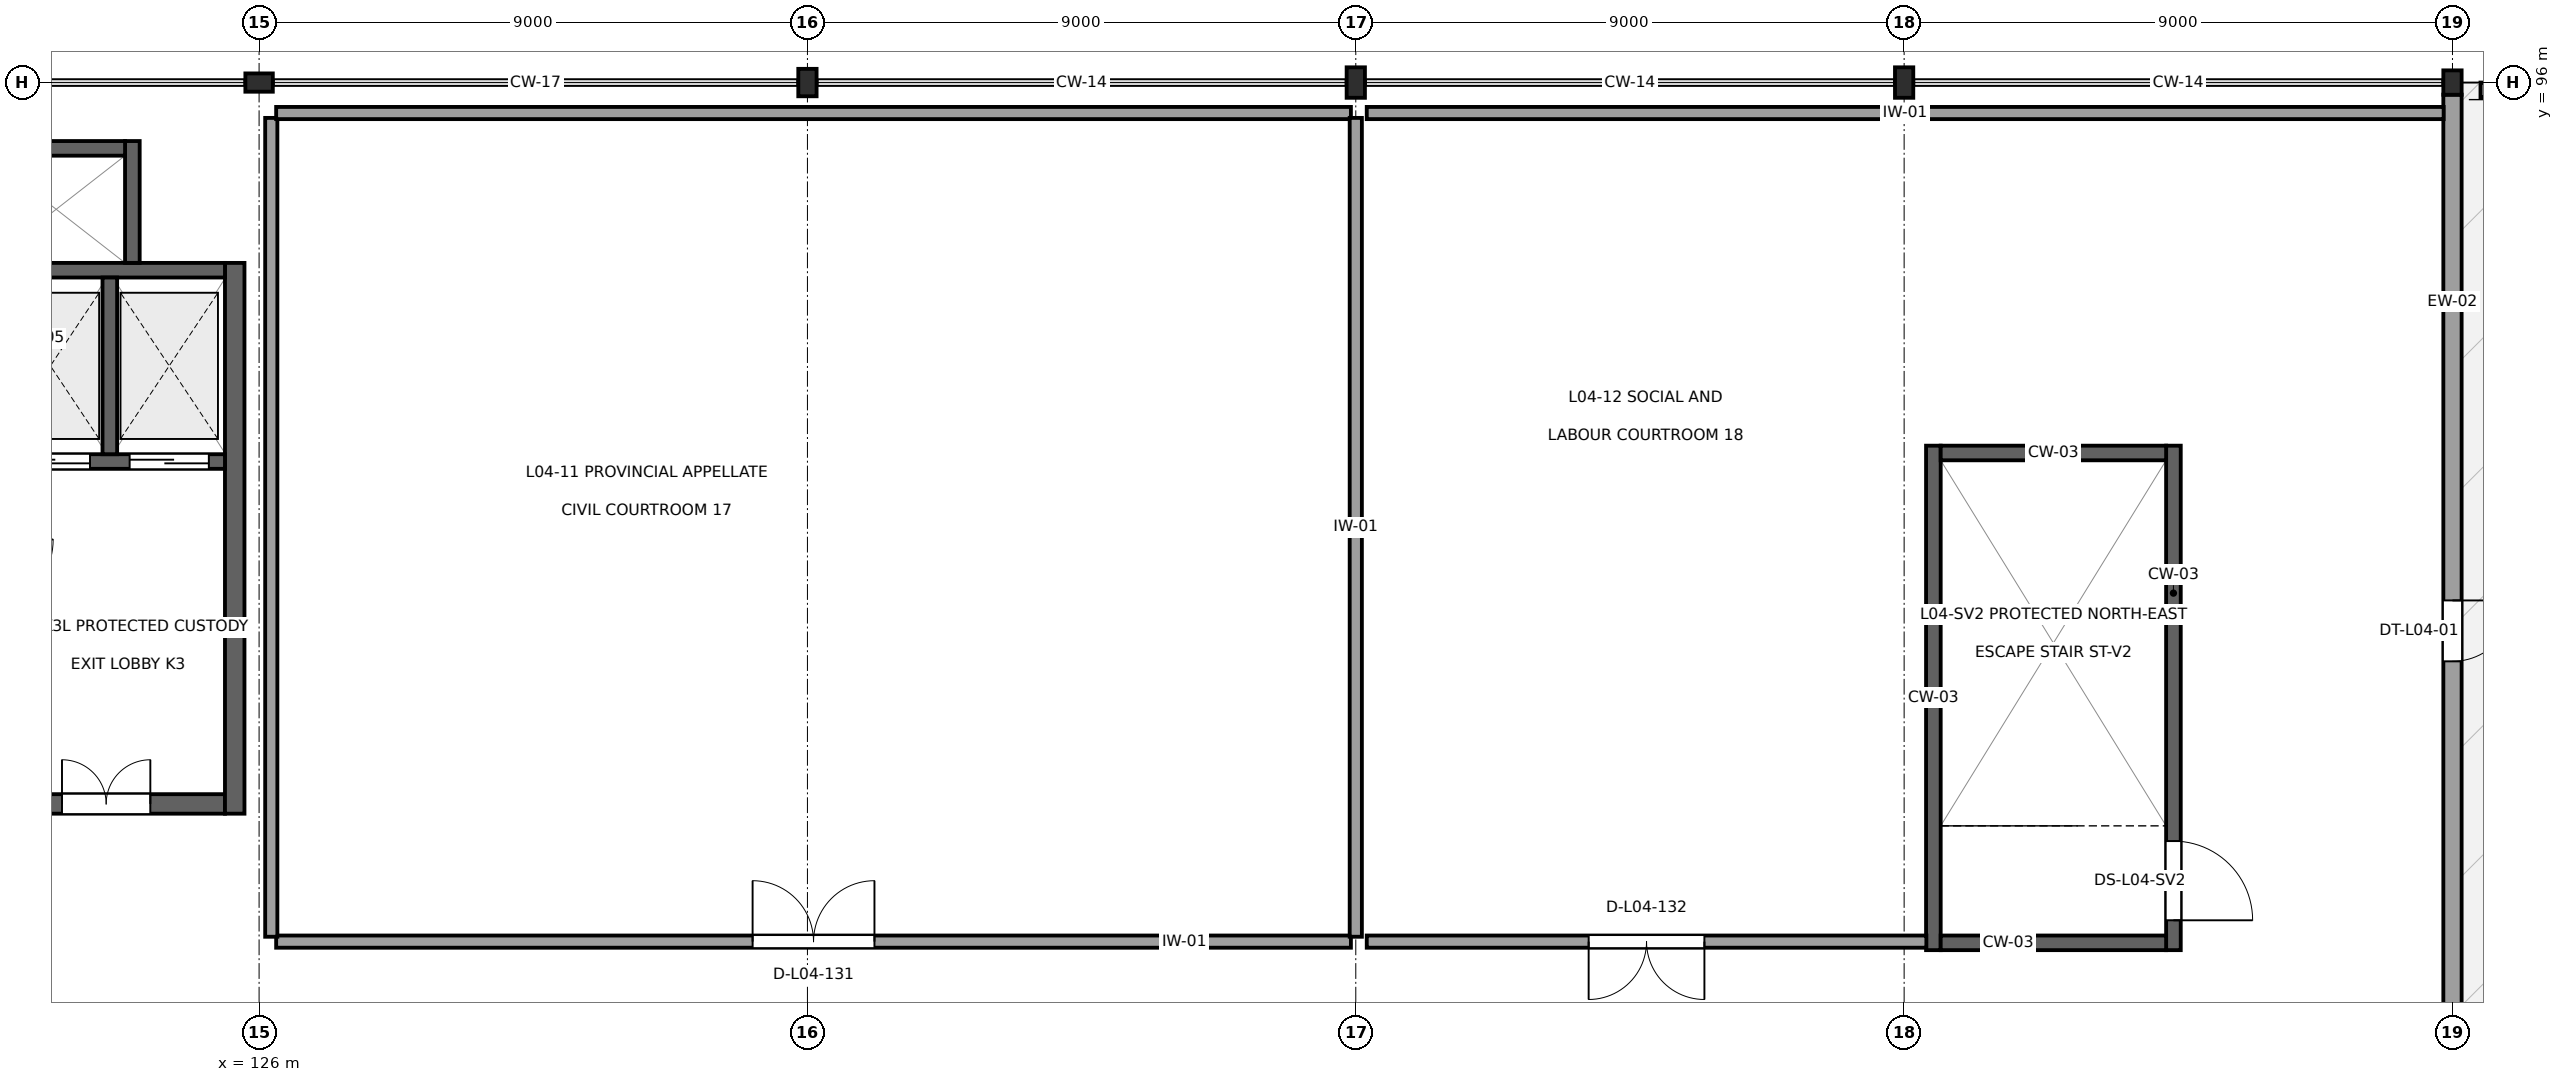
"""IFC4 building model, lengths in metres.
Left out: names, types, materials, properties, quantities, classifications, styles, units other than length and angle.
Written with IfcOpenShell. Run it as: python <this file> out.ifc"""

import sys

from ifc_helpers import new_model, si_unit, direction, frame, frame_2d, origin, origin_2d, place, context, subcontext, project, spatial, rectangle, i_section, extrude, element, fill, save


model = new_model("IFC4")
c1 = context("Model", 3, precision=1e-05, world=origin(), true_north=direction((0.0, 1.0)))
c2 = subcontext(c1, "Body", "Model", "MODEL_VIEW")
j1 = project(units=[si_unit("LENGTHUNIT", "METRE"), si_unit("PLANEANGLEUNIT", "RADIAN")], contexts=[c1])
p1 = place(None, origin())
s1 = spatial("IfcSite", under=j1, at=p1, CompositionType="ELEMENT")
p2 = place(p1, origin())
s2 = spatial("IfcBuilding", under=s1, at=p2, CompositionType="ELEMENT")
p3 = place(p2, frame((0.0, 0.0, 18.9)))
s3 = spatial("IfcBuildingStorey", under=s2, at=p3, CompositionType="ELEMENT", Elevation=18.9)
for number, where, z_axis, x_axis in (
    (1, (126.0, 96.0, 0.0), (0.0, 0.0, 1.0), (0.0, 1.0, 0.0)),
    (2, (135.0, 96.0, 0.0), (0.0, 0.0, 1.0), (1.0, 0.0, 0.0)),
):
    element("IfcColumn", number, at=place(p3, frame(where, z_axis=z_axis, x_axis=x_axis)), inside=s3, PredefinedType="COLUMN", context=c2, shape_type="SweptSolid", body=[
        extrude(i_section(OverallWidth=0.3, OverallDepth=0.45, WebThickness=0.014, FlangeThickness=0.026, at=origin_2d()), origin(), (0.0, 0.0, 1.0), 4.5),
    ])
for number, where, z_axis, x_axis in (
    (3, (144.0, 96.0, 0.0), (0.0, 0.0, 1.0), (1.0, 0.0, 0.0)),
    (4, (153.0, 96.0, 0.0), (0.0, 0.0, 1.0), (1.0, 0.0, 0.0)),
):
    element("IfcColumn", number, at=place(p3, frame(where, z_axis=z_axis, x_axis=x_axis)), inside=s3, PredefinedType="COLUMN", context=c2, shape_type="SweptSolid", body=[
        extrude(i_section(OverallWidth=0.3, OverallDepth=0.5, WebThickness=0.014, FlangeThickness=0.028, at=origin_2d()), origin(), (0.0, 0.0, 1.0), 4.5),
    ])
p4 = place(p3, frame((162.0, 96.0, 0.0), z_axis=(0.0, 0.0, 1.0), x_axis=(1.0, 0.0, 0.0)))
e5 = element("IfcColumn", 5, at=p4, inside=s3, PredefinedType="COLUMN", context=c2, shape_type="SweptSolid", body=[
    extrude(i_section(OverallWidth=0.3, OverallDepth=0.4, WebThickness=0.013, FlangeThickness=0.024, at=origin_2d()), origin(), (0.0, 0.0, 1.0), 4.5),
])
p5 = place(p3, frame((162.0, 78.198, 0.0), z_axis=(0.0, 0.0, 1.0), x_axis=(0.0, 1.0, 0.0)))
e6 = element("IfcWall", 6, at=p5, inside=s3, PredefinedType="SOLIDWALL", context=c2, shape_type="SweptSolid", body=[
    extrude(rectangle(XDim=17.604, YDim=0.3, at=frame_2d((8.802, 0.0))), origin(), (0.0, 0.0, 1.0), 4.18),
])
p6 = place(p5, frame((8.302, 0.0, 0.0)))
e7 = element("IfcOpeningElement", 7, at=p6, cuts=e6, PredefinedType="OPENING", context=c2, shape_type="SweptSolid", body=[
    extrude(rectangle(XDim=1.0, YDim=2.2, at=frame_2d((0.5, 1.1))), frame((0.0, 0.165, 0.0), z_axis=(0.0, -1.0, 0.0), x_axis=(1.0, 0.0, 0.0)), (0.0, 0.0, 1.0), 0.33),
])
p7 = place(p3, frame((162.46, 95.88, 0.0), z_axis=(0.0, 0.0, 1.0), x_axis=(1.0, 0.0, 0.0)))
e8 = element("IfcWall", 8, at=p7, inside=s3, PredefinedType="PARAPET", context=c2, shape_type="SweptSolid", body=[
    extrude(rectangle(XDim=8.48, YDim=0.24, at=frame_2d((4.24, 0.0))), origin(), (0.0, 0.0, 1.0), 0.55),
])
p8 = place(p3, frame((153.48, 81.76, 0.0), z_axis=(0.0, 0.0, 1.0), x_axis=(0.0, 1.0, 0.0)))
e9 = element("IfcWall", 9, at=p8, inside=s3, PredefinedType="SHEAR", context=c2, shape_type="SweptSolid", body=[
    extrude(rectangle(XDim=8.28, YDim=0.24, at=frame_2d((4.14, 0.0))), origin(), (0.0, 0.0, 1.0), 4.31),
])
p9 = place(p3, frame((157.42, 81.76, 0.0), z_axis=(0.0, 0.0, 1.0), x_axis=(0.0, 1.0, 0.0)))
e10 = element("IfcWall", 10, at=p9, inside=s3, PredefinedType="SHEAR", context=c2, shape_type="SweptSolid", body=[
    extrude(rectangle(XDim=8.28, YDim=0.24, at=frame_2d((4.14, 0.0))), origin(), (0.0, 0.0, 1.0), 4.31),
])
p10 = place(p9, frame((0.49, 0.0, 0.0)))
e11 = element("IfcOpeningElement", 11, at=p10, cuts=e10, PredefinedType="OPENING", context=c2, shape_type="SweptSolid", body=[
    extrude(rectangle(XDim=1.3, YDim=2.2, at=frame_2d((0.65, 1.1))), frame((0.0, 0.135, 0.0), z_axis=(0.0, -1.0, 0.0), x_axis=(1.0, 0.0, 0.0)), (0.0, 0.0, 1.0), 0.27),
])
for number, where, z_axis, x_axis in (
    (12, (153.6, 81.88, 0.0), (0.0, 0.0, 1.0), (1.0, 0.0, 0.0)),
    (13, (153.6, 89.92, 0.0), (0.0, 0.0, 1.0), (1.0, 0.0, 0.0)),
):
    element("IfcWall", number, at=place(p3, frame(where, z_axis=z_axis, x_axis=x_axis)), inside=s3, PredefinedType="SHEAR", context=c2, shape_type="SweptSolid", body=[
        extrude(rectangle(XDim=3.7, YDim=0.24, at=frame_2d((1.85, 0.0))), origin(), (0.0, 0.0, 1.0), 4.31),
    ])
p11 = place(p3, frame((121.54, 84.16, 0.0), z_axis=(0.0, 0.0, 1.0), x_axis=(1.0, 0.0, 0.0)))
e14 = element("IfcWall", 14, at=p11, inside=s3, PredefinedType="SHEAR", context=c2, shape_type="SweptSolid", body=[
    extrude(rectangle(XDim=3.9, YDim=0.32, at=frame_2d((1.95, 0.0))), origin(), (0.0, 0.0, 1.0), 4.16),
])
p12 = place(p11, frame((1.225, 0.0, 0.0)))
e15 = element("IfcOpeningElement", 15, at=p12, cuts=e14, PredefinedType="OPENING", context=c2, shape_type="SweptSolid", body=[
    extrude(rectangle(XDim=1.45, YDim=2.2, at=frame_2d((0.725, 1.1))), frame((0.0, 0.175, 0.0), z_axis=(0.0, -1.0, 0.0), x_axis=(1.0, 0.0, 0.0)), (0.0, 0.0, 1.0), 0.35),
])
p13 = place(p3, frame((125.6, 84.0, 0.0), z_axis=(0.0, 0.0, 1.0), x_axis=(0.0, 1.0, 0.0)))
e16 = element("IfcWall", 16, at=p13, inside=s3, PredefinedType="SHEAR", context=c2, shape_type="SweptSolid", body=[
    extrude(rectangle(XDim=9.04, YDim=0.32, at=frame_2d((4.52, 0.0))), origin(), (0.0, 0.0, 1.0), 4.16),
])
p14 = place(p3, frame((121.54, 89.78, 0.0), z_axis=(0.0, 0.0, 1.0), x_axis=(1.0, 0.0, 0.0)))
e17 = element("IfcWall", 17, at=p14, inside=s3, PredefinedType="SHEAR", context=c2, shape_type="SweptSolid", body=[
    extrude(rectangle(XDim=3.9, YDim=0.24, at=frame_2d((1.95, 0.0))), origin(), (0.0, 0.0, 1.0), 4.31),
])
p15 = place(p14, frame((0.385, 0.0, 0.0)))
e18 = element("IfcOpeningElement", 18, at=p15, cuts=e17, PredefinedType="OPENING", context=c2, shape_type="SweptSolid", body=[
    extrude(rectangle(XDim=1.3, YDim=2.2, at=frame_2d((0.65, 1.1))), frame((0.0, 0.135, 0.0), z_axis=(0.0, -1.0, 0.0), x_axis=(1.0, 0.0, 0.0)), (0.0, 0.0, 1.0), 0.27),
])
p16 = place(p14, frame((2.335, 0.0, 0.0)))
e19 = element("IfcOpeningElement", 19, at=p16, cuts=e17, PredefinedType="OPENING", context=c2, shape_type="SweptSolid", body=[
    extrude(rectangle(XDim=1.3, YDim=2.2, at=frame_2d((0.65, 1.1))), frame((0.0, 0.135, 0.0), z_axis=(0.0, -1.0, 0.0), x_axis=(1.0, 0.0, 0.0)), (0.0, 0.0, 1.0), 0.27),
])
p17 = place(p3, frame((121.54, 92.92, 0.0), z_axis=(0.0, 0.0, 1.0), x_axis=(1.0, 0.0, 0.0)))
e20 = element("IfcWall", 20, at=p17, inside=s3, PredefinedType="SHEAR", context=c2, shape_type="SweptSolid", body=[
    extrude(rectangle(XDim=3.9, YDim=0.24, at=frame_2d((1.95, 0.0))), origin(), (0.0, 0.0, 1.0), 4.31),
])
p18 = place(p3, frame((123.55, 89.9, 0.0), z_axis=(0.0, 0.0, 1.0), x_axis=(0.0, 1.0, 0.0)))
e21 = element("IfcWall", 21, at=p18, inside=s3, PredefinedType="SHEAR", context=c2, shape_type="SweptSolid", body=[
    extrude(rectangle(XDim=2.9, YDim=0.24, at=frame_2d((1.45, 0.0))), origin(), (0.0, 0.0, 1.0), 4.31),
])
p19 = place(p3, frame((123.92, 93.04, 0.0), z_axis=(0.0, 0.0, 1.0), x_axis=(0.0, 1.0, 0.0)))
e22 = element("IfcWall", 22, at=p19, inside=s3, PredefinedType="SHEAR", context=c2, shape_type="SweptSolid", body=[
    extrude(rectangle(XDim=2.0, YDim=0.24, at=frame_2d((1.0, 0.0))), origin(), (0.0, 0.0, 1.0), 4.31),
])
p20 = place(p3, frame((121.54, 94.92, 0.0), z_axis=(0.0, 0.0, 1.0), x_axis=(1.0, 0.0, 0.0)))
e23 = element("IfcWall", 23, at=p20, inside=s3, PredefinedType="SHEAR", context=c2, shape_type="SweptSolid", body=[
    extrude(rectangle(XDim=2.26, YDim=0.24, at=frame_2d((1.13, 0.0))), origin(), (0.0, 0.0, 1.0), 4.31),
])
p21 = place(p3, frame((143.92, 81.9, 0.0), z_axis=(0.0, 0.0, 1.0), x_axis=(-1.0, 0.0, 0.0)))
e24 = element("IfcWall", 24, at=p21, inside=s3, PredefinedType="PARTITIONING", context=c2, shape_type="SweptSolid", body=[
    extrude(rectangle(XDim=17.64, YDim=0.2, at=frame_2d((8.82, 0.0))), origin(), (0.0, 0.0, 1.0), 4.14),
])
p22 = place(p21, frame((7.82, 0.0, 0.0)))
e25 = element("IfcOpeningElement", 25, at=p22, cuts=e24, PredefinedType="OPENING", context=c2, shape_type="SweptSolid", body=[
    extrude(rectangle(XDim=2.0, YDim=2.6, at=frame_2d((1.0, 1.3))), frame((0.0, 0.115, 0.0), z_axis=(0.0, -1.0, 0.0), x_axis=(1.0, 0.0, 0.0)), (0.0, 0.0, 1.0), 0.23),
])
p23 = place(p3, frame((126.2, 81.98, 0.0), z_axis=(0.0, 0.0, 1.0), x_axis=(0.0, 1.0, 0.0)))
e26 = element("IfcWall", 26, at=p23, inside=s3, PredefinedType="PARTITIONING", context=c2, shape_type="SweptSolid", body=[
    extrude(rectangle(XDim=13.44, YDim=0.2, at=frame_2d((6.72, 0.0))), origin(), (0.0, 0.0, 1.0), 4.14),
])
p24 = place(p3, frame((126.28, 95.5, 0.0), z_axis=(0.0, 0.0, 1.0), x_axis=(1.0, 0.0, 0.0)))
e27 = element("IfcWall", 27, at=p24, inside=s3, PredefinedType="PARTITIONING", context=c2, shape_type="SweptSolid", body=[
    extrude(rectangle(XDim=17.64, YDim=0.2, at=frame_2d((8.82, 0.0))), origin(), (0.0, 0.0, 1.0), 4.14),
])
p25 = place(p3, frame((144.0, 95.42, 0.0), z_axis=(0.0, 0.0, 1.0), x_axis=(0.0, -1.0, 0.0)))
e28 = element("IfcWall", 28, at=p25, inside=s3, PredefinedType="PARTITIONING", context=c2, shape_type="SweptSolid", body=[
    extrude(rectangle(XDim=13.44, YDim=0.2, at=frame_2d((6.72, 0.0))), origin(), (0.0, 0.0, 1.0), 4.14),
])
p26 = place(p3, frame((153.365, 81.9, 0.0), z_axis=(0.0, 0.0, 1.0), x_axis=(-1.0, 0.0, 0.0)))
e29 = element("IfcWall", 29, at=p26, inside=s3, PredefinedType="PARTITIONING", context=c2, shape_type="SweptSolid", body=[
    extrude(rectangle(XDim=9.185, YDim=0.2, at=frame_2d((4.593, 0.0))), origin(), (0.0, 0.0, 1.0), 4.14),
])
p27 = place(p26, frame((3.643, 0.0, 0.0)))
e30 = element("IfcOpeningElement", 30, at=p27, cuts=e29, PredefinedType="OPENING", context=c2, shape_type="SweptSolid", body=[
    extrude(rectangle(XDim=1.9, YDim=2.5, at=frame_2d((0.95, 1.25))), frame((0.0, 0.115, 0.0), z_axis=(0.0, -1.0, 0.0), x_axis=(1.0, 0.0, 0.0)), (0.0, 0.0, 1.0), 0.23),
])
p28 = place(p3, frame((144.18, 95.5, 0.0), z_axis=(0.0, 0.0, 1.0), x_axis=(1.0, 0.0, 0.0)))
e31 = element("IfcWall", 31, at=p28, inside=s3, PredefinedType="PARTITIONING", context=c2, shape_type="SweptSolid", body=[
    extrude(rectangle(XDim=17.675, YDim=0.2, at=frame_2d((8.837, 0.0))), origin(), (0.0, 0.0, 1.0), 4.14),
])
p29 = place(p6, frame((1.0, 0.0, 0.0), z_axis=(0.0, 0.0, 1.0), x_axis=(-1.0, 0.0, 0.0)))
e32 = element("IfcDoor", 32, at=p29, inside=s3, OperationType="SINGLE_SWING_RIGHT", PredefinedType="DOOR", context=c2, shape_type="SweptSolid", body=[
    extrude(rectangle(XDim=1.0, YDim=2.2, at=frame_2d((0.5, 1.1))), frame((0.0, 0.025, 0.0), z_axis=(0.0, -1.0, 0.0), x_axis=(1.0, 0.0, 0.0)), (0.0, 0.0, 1.0), 0.05),
])
fill(e7, e32)
p30 = place(p10, frame((1.3, 0.0, 0.0), z_axis=(0.0, 0.0, 1.0), x_axis=(-1.0, 0.0, 0.0)))
e33 = element("IfcDoor", 33, at=p30, inside=s3, OperationType="SINGLE_SWING_LEFT", PredefinedType="DOOR", context=c2, shape_type="SweptSolid", body=[
    extrude(rectangle(XDim=1.3, YDim=2.2, at=frame_2d((0.65, 1.1))), frame((0.0, 0.025, 0.0), z_axis=(0.0, -1.0, 0.0), x_axis=(1.0, 0.0, 0.0)), (0.0, 0.0, 1.0), 0.05),
])
fill(e11, e33)
p31 = place(p12, origin())
e34 = element("IfcDoor", 34, at=p31, inside=s3, OperationType="DOUBLE_DOOR_SINGLE_SWING", PredefinedType="DOOR", context=c2, shape_type="SweptSolid", body=[
    extrude(rectangle(XDim=1.45, YDim=2.2, at=frame_2d((0.725, 1.1))), frame((0.0, 0.025, 0.0), z_axis=(0.0, -1.0, 0.0), x_axis=(1.0, 0.0, 0.0)), (0.0, 0.0, 1.0), 0.05),
])
fill(e15, e34)
p32 = place(p15, origin())
e35 = element("IfcDoor", 35, at=p32, inside=s3, OperationType="DOUBLE_DOOR_SLIDING", PredefinedType="DOOR", context=c2, shape_type="SweptSolid", body=[
    extrude(rectangle(XDim=1.3, YDim=2.2, at=frame_2d((0.65, 1.1))), frame((0.0, 0.025, 0.0), z_axis=(0.0, -1.0, 0.0), x_axis=(1.0, 0.0, 0.0)), (0.0, 0.0, 1.0), 0.05),
])
fill(e18, e35)
p33 = place(p16, origin())
e36 = element("IfcDoor", 36, at=p33, inside=s3, OperationType="DOUBLE_DOOR_SLIDING", PredefinedType="DOOR", context=c2, shape_type="SweptSolid", body=[
    extrude(rectangle(XDim=1.3, YDim=2.2, at=frame_2d((0.65, 1.1))), frame((0.0, 0.025, 0.0), z_axis=(0.0, -1.0, 0.0), x_axis=(1.0, 0.0, 0.0)), (0.0, 0.0, 1.0), 0.05),
])
fill(e19, e36)
p34 = place(p22, frame((2.0, 0.0, 0.0), z_axis=(0.0, 0.0, 1.0), x_axis=(-1.0, 0.0, 0.0)))
e37 = element("IfcDoor", 37, at=p34, inside=s3, OperationType="DOUBLE_DOOR_SINGLE_SWING", PredefinedType="DOOR", context=c2, shape_type="SweptSolid", body=[
    extrude(rectangle(XDim=2.0, YDim=2.6, at=frame_2d((1.0, 1.3))), frame((0.0, 0.025, 0.0), z_axis=(0.0, -1.0, 0.0), x_axis=(1.0, 0.0, 0.0)), (0.0, 0.0, 1.0), 0.05),
])
fill(e25, e37)
p35 = place(p27, origin())
e38 = element("IfcDoor", 38, at=p35, inside=s3, OperationType="DOUBLE_DOOR_SINGLE_SWING", PredefinedType="DOOR", context=c2, shape_type="SweptSolid", body=[
    extrude(rectangle(XDim=1.9, YDim=2.5, at=frame_2d((0.95, 1.25))), frame((0.0, 0.025, 0.0), z_axis=(0.0, -1.0, 0.0), x_axis=(1.0, 0.0, 0.0)), (0.0, 0.0, 1.0), 0.05),
])
fill(e30, e38)
save(model, sys.argv[1])
